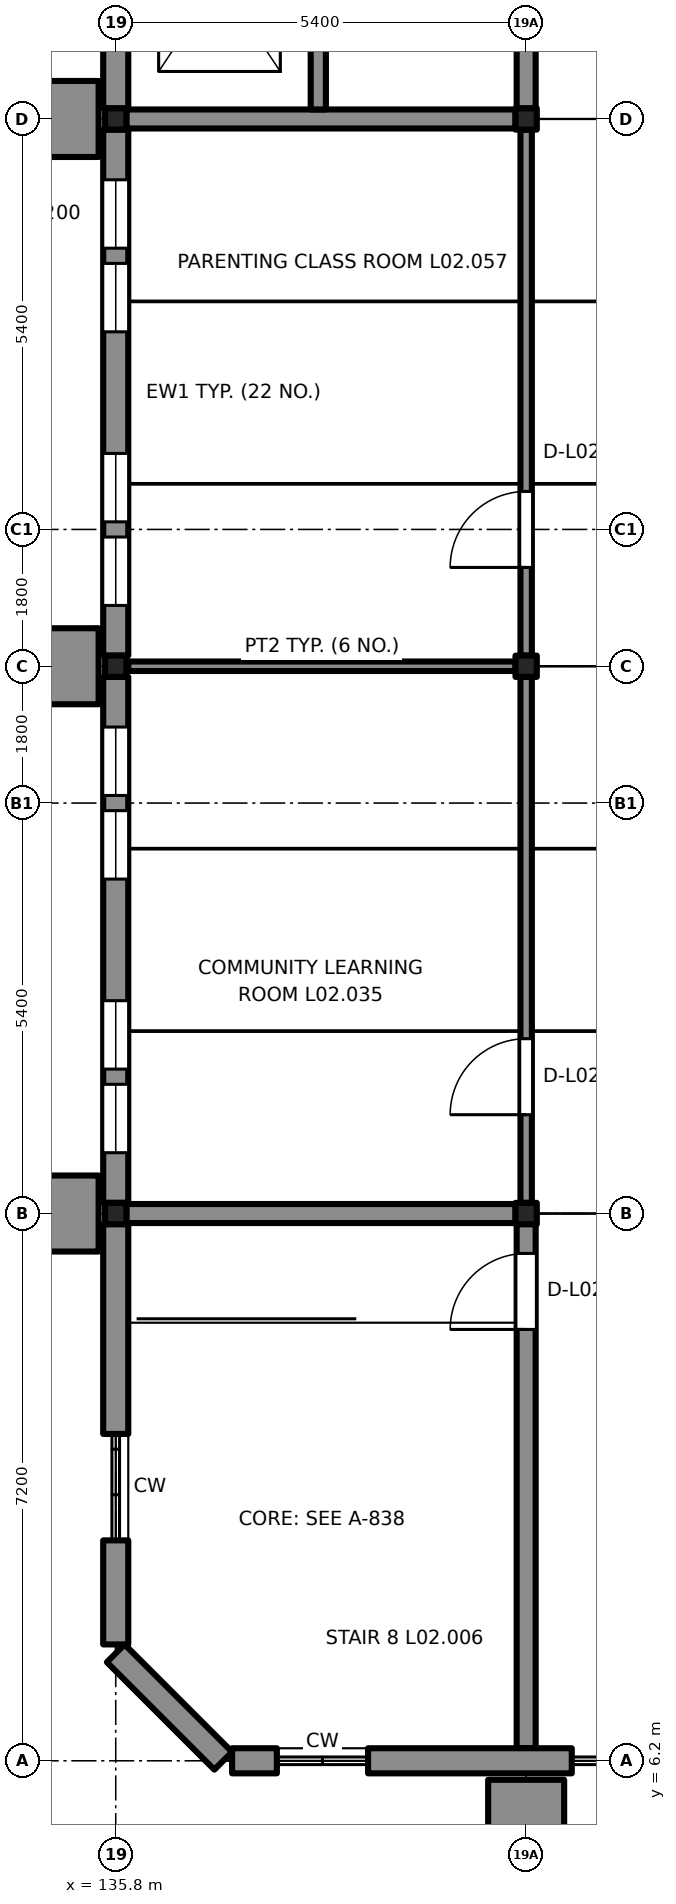
"""IFC4 building model, lengths in metres.
Left out: names, types, materials, properties, quantities, classifications, styles, units other than length and angle.
Written with IfcOpenShell. Run it as: python <this file> out.ifc"""

import sys

from ifc_helpers import new_model, si_unit, direction, frame, frame_2d, origin, origin_2d, place, context, subcontext, project, spatial, rectangle, extrude, element, fill, save


model = new_model("IFC4")
c1 = context("Model", 3, precision=1e-05, world=origin(), true_north=direction((0.0, 1.0)))
c2 = subcontext(c1, "Body", "Model", "MODEL_VIEW")
j1 = project(units=[si_unit("LENGTHUNIT", "METRE"), si_unit("PLANEANGLEUNIT", "RADIAN")], contexts=[c1])
p1 = place(None, origin())
s1 = spatial("IfcSite", under=j1, at=p1, CompositionType="ELEMENT")
p2 = place(p1, origin())
s2 = spatial("IfcBuilding", under=s1, at=p2, CompositionType="ELEMENT")
p3 = place(p2, frame((0.0, 0.0, 10.2)))
s3 = spatial("IfcBuildingStorey", under=s2, at=p3, CompositionType="ELEMENT", Elevation=10.2)
for number, where, z_axis, x_axis in (
    (1, (135.8, 13.4, 0.0), (0.0, 0.0, 1.0), (1.0, 0.0, 0.0)),
    (2, (141.2, 13.4, 0.0), (0.0, 0.0, 1.0), (1.0, 0.0, 0.0)),
    (3, (135.8, 20.6, 0.0), (0.0, 0.0, 1.0), (1.0, 0.0, 0.0)),
    (4, (141.2, 20.6, 0.0), (0.0, 0.0, 1.0), (1.0, 0.0, 0.0)),
    (5, (135.8, 27.8, 0.0), (0.0, 0.0, 1.0), (1.0, 0.0, 0.0)),
    (6, (141.2, 27.8, 0.0), (0.0, 0.0, 1.0), (1.0, 0.0, 0.0)),
):
    element("IfcColumn", number, at=place(p3, frame(where, z_axis=z_axis, x_axis=x_axis)), inside=s3, PredefinedType="COLUMN", context=c2, shape_type="SweptSolid", body=[
        extrude(rectangle(XDim=0.28, YDim=0.28, at=origin_2d()), origin(), (0.0, 0.0, 1.0), 3.9),
    ])
p4 = place(p3, frame((141.2, 6.365, 0.0), z_axis=(0.0, 0.0, 1.0), x_axis=(0.0, 1.0, 0.0)))
e7 = element("IfcWall", 7, at=p4, inside=s3, PredefinedType="SHEAR", context=c2, shape_type="SweptSolid", body=[
    extrude(rectangle(XDim=6.895, YDim=0.25, at=frame_2d((3.448, 0.0))), origin(), (0.0, 0.0, 1.0), 3.2),
])
p5 = place(p4, frame((5.51, 0.0, 0.0)))
e8 = element("IfcOpeningElement", 8, at=p5, cuts=e7, PredefinedType="OPENING", context=c2, shape_type="SweptSolid", body=[
    extrude(rectangle(XDim=1.0, YDim=2.1, at=frame_2d((0.5, 1.05))), frame((0.0, 0.135, 0.0), z_axis=(0.0, -1.0, 0.0), x_axis=(1.0, 0.0, 0.0)), (0.0, 0.0, 1.0), 0.27),
])
p6 = place(p3, frame((135.94, 13.4, 0.0), z_axis=(0.0, 0.0, 1.0), x_axis=(1.0, 0.0, 0.0)))
e9 = element("IfcWall", 9, at=p6, inside=s3, PredefinedType="SHEAR", context=c2, shape_type="SweptSolid", body=[
    extrude(rectangle(XDim=5.12, YDim=0.25, at=frame_2d((2.56, 0.0))), origin(), (0.0, 0.0, 1.0), 3.2),
])
p7 = place(p3, frame((141.2, 27.94, 0.0), z_axis=(0.0, 0.0, 1.0), x_axis=(0.0, 1.0, 0.0)))
e10 = element("IfcWall", 10, at=p7, inside=s3, PredefinedType="SHEAR", context=c2, shape_type="SweptSolid", body=[
    extrude(rectangle(XDim=6.92, YDim=0.25, at=frame_2d((3.46, 0.0))), origin(), (0.0, 0.0, 1.0), 3.2),
])
p8 = place(p7, frame((4.16, 0.0, 0.0)))
e11 = element("IfcOpeningElement", 11, at=p8, cuts=e10, PredefinedType="OPENING", context=c2, shape_type="SweptSolid", body=[
    extrude(rectangle(XDim=1.8, YDim=2.1, at=frame_2d((0.9, 1.05))), frame((0.0, 0.135, 0.0), z_axis=(0.0, -1.0, 0.0), x_axis=(1.0, 0.0, 0.0)), (0.0, 0.0, 1.0), 0.27),
])
p9 = place(p3, frame((135.94, 27.8, 0.0), z_axis=(0.0, 0.0, 1.0), x_axis=(1.0, 0.0, 0.0)))
e12 = element("IfcWall", 12, at=p9, inside=s3, PredefinedType="SHEAR", context=c2, shape_type="SweptSolid", body=[
    extrude(rectangle(XDim=5.12, YDim=0.25, at=frame_2d((2.56, 0.0))), origin(), (0.0, 0.0, 1.0), 3.2),
])
p10 = place(p3, frame((138.465, 27.925, 0.0), z_axis=(0.0, 0.0, 1.0), x_axis=(0.0, 1.0, 0.0)))
e13 = element("IfcWall", 13, at=p10, inside=s3, PredefinedType="SHEAR", context=c2, shape_type="SweptSolid", body=[
    extrude(rectangle(XDim=3.0, YDim=0.2, at=frame_2d((1.5, 0.0))), origin(), (0.0, 0.0, 1.0), 3.2),
])
p11 = place(p3, frame((135.8, 7.731, 0.0), z_axis=(0.0, 0.0, 1.0), x_axis=(0.0, 1.0, 0.0)))
e14 = element("IfcWall", 14, at=p11, inside=s3, PredefinedType="SOLIDWALL", context=c2, shape_type="SweptSolid", body=[
    extrude(rectangle(XDim=1.369, YDim=0.33, at=frame_2d((0.685, 0.0))), origin(), (0.0, 0.0, 1.0), 3.2),
])
p12 = place(p3, frame((135.8, 10.5, 0.0), z_axis=(0.0, 0.0, 1.0), x_axis=(0.0, 1.0, 0.0)))
e15 = element("IfcWall", 15, at=p12, inside=s3, PredefinedType="SOLIDWALL", context=c2, shape_type="SweptSolid", body=[
    extrude(rectangle(XDim=2.76, YDim=0.33, at=frame_2d((1.38, 0.0))), origin(), (0.0, 0.0, 1.0), 3.2),
])
p13 = place(p3, frame((135.8, 13.54, 0.0), z_axis=(0.0, 0.0, 1.0), x_axis=(0.0, 1.0, 0.0)))
e16 = element("IfcWall", 16, at=p13, inside=s3, PredefinedType="SOLIDWALL", context=c2, shape_type="SweptSolid", body=[
    extrude(rectangle(XDim=6.92, YDim=0.33, at=frame_2d((3.46, 0.0))), origin(), (0.0, 0.0, 1.0), 3.2),
])
p14 = place(p13, frame((0.66, 0.0, 0.6)))
e17 = element("IfcOpeningElement", 17, at=p14, cuts=e16, PredefinedType="OPENING", context=c2, shape_type="SweptSolid", body=[
    extrude(rectangle(XDim=0.9, YDim=2.4, at=frame_2d((0.45, 1.2))), frame((0.0, 0.175, 0.0), z_axis=(0.0, -1.0, 0.0), x_axis=(1.0, 0.0, 0.0)), (0.0, 0.0, 1.0), 0.35),
])
p15 = place(p13, frame((1.76, 0.0, 0.6)))
e18 = element("IfcOpeningElement", 18, at=p15, cuts=e16, PredefinedType="OPENING", context=c2, shape_type="SweptSolid", body=[
    extrude(rectangle(XDim=0.9, YDim=2.4, at=frame_2d((0.45, 1.2))), frame((0.0, 0.175, 0.0), z_axis=(0.0, -1.0, 0.0), x_axis=(1.0, 0.0, 0.0)), (0.0, 0.0, 1.0), 0.35),
])
p16 = place(p13, frame((4.26, 0.0, 0.6)))
e19 = element("IfcOpeningElement", 19, at=p16, cuts=e16, PredefinedType="OPENING", context=c2, shape_type="SweptSolid", body=[
    extrude(rectangle(XDim=0.9, YDim=2.4, at=frame_2d((0.45, 1.2))), frame((0.0, 0.175, 0.0), z_axis=(0.0, -1.0, 0.0), x_axis=(1.0, 0.0, 0.0)), (0.0, 0.0, 1.0), 0.35),
])
p17 = place(p13, frame((5.36, 0.0, 0.6)))
e20 = element("IfcOpeningElement", 20, at=p17, cuts=e16, PredefinedType="OPENING", context=c2, shape_type="SweptSolid", body=[
    extrude(rectangle(XDim=0.9, YDim=2.4, at=frame_2d((0.45, 1.2))), frame((0.0, 0.175, 0.0), z_axis=(0.0, -1.0, 0.0), x_axis=(1.0, 0.0, 0.0)), (0.0, 0.0, 1.0), 0.35),
])
p18 = place(p3, frame((135.8, 20.74, 0.0), z_axis=(0.0, 0.0, 1.0), x_axis=(0.0, 1.0, 0.0)))
e21 = element("IfcWall", 21, at=p18, inside=s3, PredefinedType="SOLIDWALL", context=c2, shape_type="SweptSolid", body=[
    extrude(rectangle(XDim=6.92, YDim=0.33, at=frame_2d((3.46, 0.0))), origin(), (0.0, 0.0, 1.0), 3.2),
])
p19 = place(p18, frame((0.66, 0.0, 0.6)))
e22 = element("IfcOpeningElement", 22, at=p19, cuts=e21, PredefinedType="OPENING", context=c2, shape_type="SweptSolid", body=[
    extrude(rectangle(XDim=0.9, YDim=2.4, at=frame_2d((0.45, 1.2))), frame((0.0, 0.175, 0.0), z_axis=(0.0, -1.0, 0.0), x_axis=(1.0, 0.0, 0.0)), (0.0, 0.0, 1.0), 0.35),
])
p20 = place(p18, frame((1.76, 0.0, 0.6)))
e23 = element("IfcOpeningElement", 23, at=p20, cuts=e21, PredefinedType="OPENING", context=c2, shape_type="SweptSolid", body=[
    extrude(rectangle(XDim=0.9, YDim=2.4, at=frame_2d((0.45, 1.2))), frame((0.0, 0.175, 0.0), z_axis=(0.0, -1.0, 0.0), x_axis=(1.0, 0.0, 0.0)), (0.0, 0.0, 1.0), 0.35),
])
p21 = place(p18, frame((4.26, 0.0, 0.6)))
e24 = element("IfcOpeningElement", 24, at=p21, cuts=e21, PredefinedType="OPENING", context=c2, shape_type="SweptSolid", body=[
    extrude(rectangle(XDim=0.9, YDim=2.4, at=frame_2d((0.45, 1.2))), frame((0.0, 0.175, 0.0), z_axis=(0.0, -1.0, 0.0), x_axis=(1.0, 0.0, 0.0)), (0.0, 0.0, 1.0), 0.35),
])
p22 = place(p18, frame((5.36, 0.0, 0.6)))
e25 = element("IfcOpeningElement", 25, at=p22, cuts=e21, PredefinedType="OPENING", context=c2, shape_type="SweptSolid", body=[
    extrude(rectangle(XDim=0.9, YDim=2.4, at=frame_2d((0.45, 1.2))), frame((0.0, 0.175, 0.0), z_axis=(0.0, -1.0, 0.0), x_axis=(1.0, 0.0, 0.0)), (0.0, 0.0, 1.0), 0.35),
])
p23 = place(p3, frame((135.8, 27.94, 0.0), z_axis=(0.0, 0.0, 1.0), x_axis=(0.0, 1.0, 0.0)))
e26 = element("IfcWall", 26, at=p23, inside=s3, PredefinedType="SOLIDWALL", context=c2, shape_type="SweptSolid", body=[
    extrude(rectangle(XDim=6.92, YDim=0.33, at=frame_2d((3.46, 0.0))), origin(), (0.0, 0.0, 1.0), 3.2),
])
for number, where, z_axis, x_axis in (
    (27, (135.2, 12.9, 0.0), (0.0, 0.0, 1.0), (0.0, 1.0, 0.0)),
    (28, (135.2, 20.1, 0.0), (0.0, 0.0, 1.0), (0.0, 1.0, 0.0)),
    (29, (135.2, 27.3, 0.0), (0.0, 0.0, 1.0), (0.0, 1.0, 0.0)),
):
    element("IfcWall", number, at=place(p3, frame(where, z_axis=z_axis, x_axis=x_axis)), inside=s3, PredefinedType="SOLIDWALL", context=c2, shape_type="SweptSolid", body=[
        extrude(rectangle(XDim=1.0, YDim=0.75, at=frame_2d((0.5, 0.0))), origin(), (0.0, 0.0, 1.0), 3.9),
    ])
p24 = place(p3, frame((137.92, 6.2, 0.0), z_axis=(0.0, 0.0, 1.0), x_axis=(-1.0, 0.0, 0.0)))
e30 = element("IfcWall", 30, at=p24, inside=s3, PredefinedType="SOLIDWALL", context=c2, shape_type="SweptSolid", body=[
    extrude(rectangle(XDim=0.589, YDim=0.33, at=frame_2d((0.294, 0.0))), origin(), (0.0, 0.0, 1.0), 3.2),
])
p25 = place(p3, frame((141.8, 6.2, 0.0), z_axis=(0.0, 0.0, 1.0), x_axis=(-1.0, 0.0, 0.0)))
e31 = element("IfcWall", 31, at=p25, inside=s3, PredefinedType="SOLIDWALL", context=c2, shape_type="SweptSolid", body=[
    extrude(rectangle(XDim=2.68, YDim=0.33, at=frame_2d((1.34, 0.0))), origin(), (0.0, 0.0, 1.0), 3.2),
])
p26 = place(p3, frame((141.7, 5.575, 0.0), z_axis=(0.0, 0.0, 1.0), x_axis=(-1.0, 0.0, 0.0)))
e32 = element("IfcWall", 32, at=p26, inside=s3, PredefinedType="SOLIDWALL", context=c2, shape_type="SweptSolid", body=[
    extrude(rectangle(XDim=1.0, YDim=0.75, at=frame_2d((0.5, 0.0))), origin(), (0.0, 0.0, 1.0), 3.9),
])
p27 = place(p3, frame((135.8, 7.614, 0.0), z_axis=(0.0, 0.0, 1.0), x_axis=(0.707106781187, -0.707106781187, 0.0)))
e33 = element("IfcWall", 33, at=p27, inside=s3, PredefinedType="SOLIDWALL", context=c2, shape_type="SweptSolid", body=[
    extrude(rectangle(XDim=2.0, YDim=0.33, at=frame_2d((1.0, 0.0))), origin(), (0.0, 0.0, 1.0), 3.2),
])
p28 = place(p3, frame((138.8, 6.2, 3.6), z_axis=(0.0, 0.0, 1.0), x_axis=(-1.0, 0.0, 0.0)))
e34 = element("IfcWall", 34, at=p28, inside=s3, PredefinedType="SOLIDWALL", context=c2, shape_type="SweptSolid", body=[
    extrude(rectangle(XDim=1.469, YDim=0.33, at=frame_2d((0.734, 0.0))), origin(), (0.0, 0.0, 1.0), 4.4),
])
p29 = place(p3, frame((140.3, 6.2, 3.6), z_axis=(0.0, 0.0, 1.0), x_axis=(-1.0, 0.0, 0.0)))
e35 = element("IfcWall", 35, at=p29, inside=s3, PredefinedType="SOLIDWALL", context=c2, shape_type="SweptSolid", body=[
    extrude(rectangle(XDim=1.5, YDim=0.33, at=frame_2d((0.75, 0.0))), origin(), (0.0, 0.0, 1.0), 5.4),
])
p30 = place(p3, frame((141.8, 6.2, 3.6), z_axis=(0.0, 0.0, 1.0), x_axis=(-1.0, 0.0, 0.0)))
e36 = element("IfcWall", 36, at=p30, inside=s3, PredefinedType="SOLIDWALL", context=c2, shape_type="SweptSolid", body=[
    extrude(rectangle(XDim=1.5, YDim=0.33, at=frame_2d((0.75, 0.0))), origin(), (0.0, 0.0, 1.0), 6.45),
])
p31 = place(p3, frame((144.2, 6.2, 3.6), z_axis=(0.0, 0.0, 1.0), x_axis=(-1.0, 0.0, 0.0)))
e37 = element("IfcWall", 37, at=p31, inside=s3, PredefinedType="SOLIDWALL", context=c2, shape_type="SweptSolid", body=[
    extrude(rectangle(XDim=2.4, YDim=0.33, at=frame_2d((1.2, 0.0))), origin(), (0.0, 0.0, 1.0), 7.25),
])
p32 = place(p3, frame((141.2, 13.54, 0.0), z_axis=(0.0, 0.0, 1.0), x_axis=(0.0, 1.0, 0.0)))
e38 = element("IfcWall", 38, at=p32, inside=s3, PredefinedType="PARTITIONING", context=c2, shape_type="SweptSolid", body=[
    extrude(rectangle(XDim=6.92, YDim=0.15, at=frame_2d((3.46, 0.0))), origin(), (0.0, 0.0, 1.0), 4.467),
])
p33 = place(p32, frame((1.16, 0.0, 0.0)))
e39 = element("IfcOpeningElement", 39, at=p33, cuts=e38, PredefinedType="OPENING", context=c2, shape_type="SweptSolid", body=[
    extrude(rectangle(XDim=1.0, YDim=2.1, at=frame_2d((0.5, 1.05))), frame((0.0, 0.085, 0.0), z_axis=(0.0, -1.0, 0.0), x_axis=(1.0, 0.0, 0.0)), (0.0, 0.0, 1.0), 0.17),
])
p34 = place(p3, frame((141.2, 20.74, 0.0), z_axis=(0.0, 0.0, 1.0), x_axis=(0.0, 1.0, 0.0)))
e40 = element("IfcWall", 40, at=p34, inside=s3, PredefinedType="PARTITIONING", context=c2, shape_type="SweptSolid", body=[
    extrude(rectangle(XDim=6.92, YDim=0.15, at=frame_2d((3.46, 0.0))), origin(), (0.0, 0.0, 1.0), 4.467),
])
p35 = place(p34, frame((1.16, 0.0, 0.0)))
e41 = element("IfcOpeningElement", 41, at=p35, cuts=e40, PredefinedType="OPENING", context=c2, shape_type="SweptSolid", body=[
    extrude(rectangle(XDim=1.0, YDim=2.1, at=frame_2d((0.5, 1.05))), frame((0.0, 0.085, 0.0), z_axis=(0.0, -1.0, 0.0), x_axis=(1.0, 0.0, 0.0)), (0.0, 0.0, 1.0), 0.17),
])
p36 = place(p3, frame((135.965, 20.6, 0.0), z_axis=(0.0, 0.0, 1.0), x_axis=(1.0, 0.0, 0.0)))
e42 = element("IfcWall", 42, at=p36, inside=s3, PredefinedType="PARTITIONING", context=c2, shape_type="SweptSolid", body=[
    extrude(rectangle(XDim=5.095, YDim=0.125, at=frame_2d((2.547, 0.0))), origin(), (0.0, 0.0, 1.0), 3.9),
])
p37 = place(p5, origin())
e43 = element("IfcDoor", 43, at=p37, inside=s3, OperationType="SINGLE_SWING_RIGHT", PredefinedType="DOOR", context=c2, shape_type="SweptSolid", body=[
    extrude(rectangle(XDim=1.0, YDim=2.1, at=frame_2d((0.5, 1.05))), frame((0.0, 0.025, 0.0), z_axis=(0.0, -1.0, 0.0), x_axis=(1.0, 0.0, 0.0)), (0.0, 0.0, 1.0), 0.05),
])
fill(e8, e43)
p38 = place(p14, origin())
e44 = element("IfcWindow", 44, at=p38, inside=s3, PartitioningType="SINGLE_PANEL", PredefinedType="WINDOW", context=c2, shape_type="SweptSolid", body=[
    extrude(rectangle(XDim=0.9, YDim=2.4, at=frame_2d((0.45, 1.2))), frame((0.0, -0.03, 0.0), z_axis=(0.0, -1.0, 0.0), x_axis=(1.0, 0.0, 0.0)), (0.0, 0.0, 1.0), 0.06),
])
fill(e17, e44)
p39 = place(p15, origin())
e45 = element("IfcWindow", 45, at=p39, inside=s3, PartitioningType="SINGLE_PANEL", PredefinedType="WINDOW", context=c2, shape_type="SweptSolid", body=[
    extrude(rectangle(XDim=0.9, YDim=2.4, at=frame_2d((0.45, 1.2))), frame((0.0, -0.03, 0.0), z_axis=(0.0, -1.0, 0.0), x_axis=(1.0, 0.0, 0.0)), (0.0, 0.0, 1.0), 0.06),
])
fill(e18, e45)
p40 = place(p16, origin())
e46 = element("IfcWindow", 46, at=p40, inside=s3, PartitioningType="SINGLE_PANEL", PredefinedType="WINDOW", context=c2, shape_type="SweptSolid", body=[
    extrude(rectangle(XDim=0.9, YDim=2.4, at=frame_2d((0.45, 1.2))), frame((0.0, -0.03, 0.0), z_axis=(0.0, -1.0, 0.0), x_axis=(1.0, 0.0, 0.0)), (0.0, 0.0, 1.0), 0.06),
])
fill(e19, e46)
p41 = place(p17, origin())
e47 = element("IfcWindow", 47, at=p41, inside=s3, PartitioningType="SINGLE_PANEL", PredefinedType="WINDOW", context=c2, shape_type="SweptSolid", body=[
    extrude(rectangle(XDim=0.9, YDim=2.4, at=frame_2d((0.45, 1.2))), frame((0.0, -0.03, 0.0), z_axis=(0.0, -1.0, 0.0), x_axis=(1.0, 0.0, 0.0)), (0.0, 0.0, 1.0), 0.06),
])
fill(e20, e47)
p42 = place(p19, origin())
e48 = element("IfcWindow", 48, at=p42, inside=s3, PartitioningType="SINGLE_PANEL", PredefinedType="WINDOW", context=c2, shape_type="SweptSolid", body=[
    extrude(rectangle(XDim=0.9, YDim=2.4, at=frame_2d((0.45, 1.2))), frame((0.0, -0.03, 0.0), z_axis=(0.0, -1.0, 0.0), x_axis=(1.0, 0.0, 0.0)), (0.0, 0.0, 1.0), 0.06),
])
fill(e22, e48)
p43 = place(p20, origin())
e49 = element("IfcWindow", 49, at=p43, inside=s3, PartitioningType="SINGLE_PANEL", PredefinedType="WINDOW", context=c2, shape_type="SweptSolid", body=[
    extrude(rectangle(XDim=0.9, YDim=2.4, at=frame_2d((0.45, 1.2))), frame((0.0, -0.03, 0.0), z_axis=(0.0, -1.0, 0.0), x_axis=(1.0, 0.0, 0.0)), (0.0, 0.0, 1.0), 0.06),
])
fill(e23, e49)
p44 = place(p21, origin())
e50 = element("IfcWindow", 50, at=p44, inside=s3, PartitioningType="SINGLE_PANEL", PredefinedType="WINDOW", context=c2, shape_type="SweptSolid", body=[
    extrude(rectangle(XDim=0.9, YDim=2.4, at=frame_2d((0.45, 1.2))), frame((0.0, -0.03, 0.0), z_axis=(0.0, -1.0, 0.0), x_axis=(1.0, 0.0, 0.0)), (0.0, 0.0, 1.0), 0.06),
])
fill(e24, e50)
p45 = place(p22, origin())
e51 = element("IfcWindow", 51, at=p45, inside=s3, PartitioningType="SINGLE_PANEL", PredefinedType="WINDOW", context=c2, shape_type="SweptSolid", body=[
    extrude(rectangle(XDim=0.9, YDim=2.4, at=frame_2d((0.45, 1.2))), frame((0.0, -0.03, 0.0), z_axis=(0.0, -1.0, 0.0), x_axis=(1.0, 0.0, 0.0)), (0.0, 0.0, 1.0), 0.06),
])
fill(e25, e51)
p46 = place(p33, origin())
e52 = element("IfcDoor", 52, at=p46, inside=s3, OperationType="SINGLE_SWING_LEFT", PredefinedType="DOOR", context=c2, shape_type="SweptSolid", body=[
    extrude(rectangle(XDim=1.0, YDim=2.1, at=frame_2d((0.5, 1.05))), frame((0.0, 0.025, 0.0), z_axis=(0.0, -1.0, 0.0), x_axis=(1.0, 0.0, 0.0)), (0.0, 0.0, 1.0), 0.05),
])
fill(e39, e52)
p47 = place(p35, origin())
e53 = element("IfcDoor", 53, at=p47, inside=s3, OperationType="SINGLE_SWING_LEFT", PredefinedType="DOOR", context=c2, shape_type="SweptSolid", body=[
    extrude(rectangle(XDim=1.0, YDim=2.1, at=frame_2d((0.5, 1.05))), frame((0.0, 0.025, 0.0), z_axis=(0.0, -1.0, 0.0), x_axis=(1.0, 0.0, 0.0)), (0.0, 0.0, 1.0), 0.05),
])
fill(e41, e53)
save(model, sys.argv[1])
